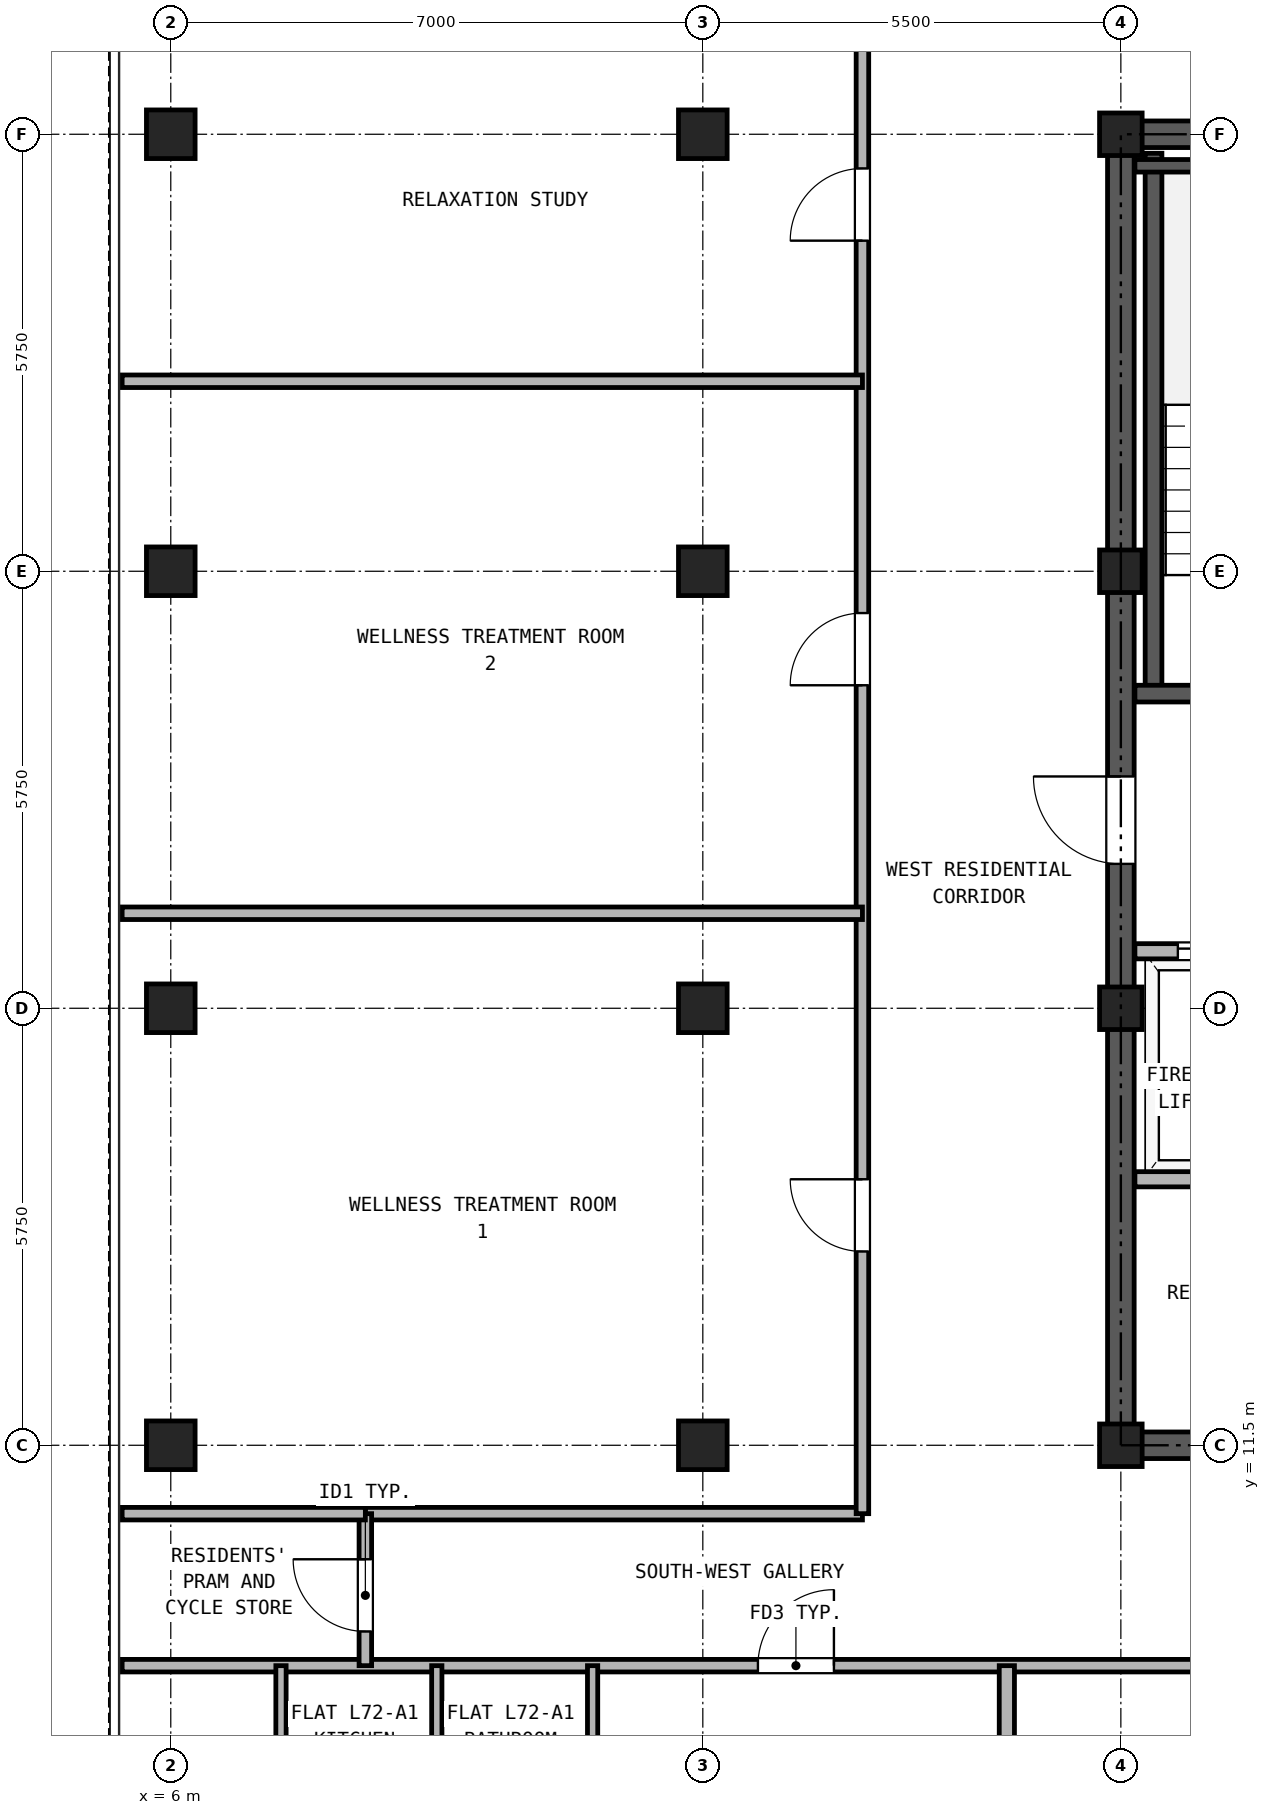
"""IFC4 building model, lengths in metres.
Left out: names, types, materials, properties, quantities, classifications, styles, units other than length and angle.
Written with IfcOpenShell. Run it as: python <this file> out.ifc"""

import sys

from ifc_helpers import new_model, si_unit, direction, frame, frame_2d, origin, origin_2d, place, context, subcontext, project, spatial, rectangle, hollow_rectangle, extrude, source, transform, mapped, element, fill, save


model = new_model("IFC4")
c1 = context("Model", 3, precision=1e-05, world=origin(), true_north=direction((0.0, 1.0)))
c2 = subcontext(c1, "Body", "Model", "MODEL_VIEW")
j1 = project(units=[si_unit("LENGTHUNIT", "METRE"), si_unit("PLANEANGLEUNIT", "RADIAN")], contexts=[c1])
p1 = place(None, origin())
s1 = spatial("IfcSite", under=j1, at=p1, CompositionType="ELEMENT")
p2 = place(p1, origin())
s2 = spatial("IfcBuilding", under=s1, at=p2, CompositionType="ELEMENT")
p3 = place(p2, frame((0.0, 0.0, 252.1)))
s3 = spatial("IfcBuildingStorey", under=s2, at=p3, CompositionType="ELEMENT", Elevation=252.1)
m1 = source(origin(), c2, "Body", "SweptSolid", [
    extrude(hollow_rectangle(XDim=0.64, YDim=0.64, WallThickness=0.035, at=origin_2d()), origin(), (0.0, 0.0, 1.0), 2.98),
])
for number, where, z_axis, x_axis in (
    (1, (6.0, 11.5, 0.0), (0.0, 0.0, 1.0), (1.0, 0.0, 0.0)),
    (2, (6.0, 17.25, 0.0), (0.0, 0.0, 1.0), (1.0, 0.0, 0.0)),
    (3, (6.0, 23.0, 0.0), (0.0, 0.0, 1.0), (1.0, 0.0, 0.0)),
    (4, (6.0, 28.75, 0.0), (0.0, 0.0, 1.0), (1.0, 0.0, 0.0)),
    (5, (13.0, 11.5, 0.0), (0.0, 0.0, 1.0), (1.0, 0.0, 0.0)),
    (6, (13.0, 17.25, 0.0), (0.0, 0.0, 1.0), (1.0, 0.0, 0.0)),
    (7, (13.0, 23.0, 0.0), (0.0, 0.0, 1.0), (1.0, 0.0, 0.0)),
    (8, (13.0, 28.75, 0.0), (0.0, 0.0, 1.0), (1.0, 0.0, 0.0)),
):
    element("IfcColumn", number, at=place(p3, frame(where, z_axis=z_axis, x_axis=x_axis)), inside=s3, PredefinedType="COLUMN", context=c2, shape_type="MappedRepresentation", body=[
        mapped(m1, transform((0.0, 0.0, 0.0), x_axis=(1.0, 0.0, 0.0), y_axis=(0.0, 1.0, 0.0), z_axis=(0.0, 0.0, 1.0), scale=1.0)),
    ])
m2 = source(origin(), c2, "Body", "SweptSolid", [
    extrude(hollow_rectangle(XDim=0.56, YDim=0.56, WallThickness=0.03, at=origin_2d()), origin(), (0.0, 0.0, 1.0), 2.98),
])
for number, where, z_axis, x_axis in (
    (9, (18.5, 11.5, 0.0), (0.0, 0.0, 1.0), (1.0, 0.0, 0.0)),
    (10, (18.5, 17.25, 0.0), (0.0, 0.0, 1.0), (1.0, 0.0, 0.0)),
    (11, (18.5, 23.0, 0.0), (0.0, 0.0, 1.0), (1.0, 0.0, 0.0)),
    (12, (18.5, 28.75, 0.0), (0.0, 0.0, 1.0), (1.0, 0.0, 0.0)),
):
    element("IfcColumn", number, at=place(p3, frame(where, z_axis=z_axis, x_axis=x_axis)), inside=s3, PredefinedType="COLUMN", context=c2, shape_type="MappedRepresentation", body=[
        mapped(m2, transform((0.0, 0.0, 0.0), x_axis=(1.0, 0.0, 0.0), y_axis=(0.0, 1.0, 0.0), z_axis=(0.0, 0.0, 1.0), scale=1.0)),
    ])
p4 = place(p3, frame((18.325, 11.5, 0.0), z_axis=(0.0, 0.0, 1.0), x_axis=(1.0, 0.0, 0.0)))
e13 = element("IfcWall", 13, at=p4, inside=s3, PredefinedType="SHEAR", context=c2, shape_type="SweptSolid", body=[
    extrude(rectangle(XDim=10.35, YDim=0.35, at=frame_2d((5.175, 0.0))), origin(), (0.0, 0.0, 1.0), 2.98),
])
p5 = place(p4, frame((1.775, 0.0, 0.0)))
e14 = element("IfcOpeningElement", 14, at=p5, cuts=e13, PredefinedType="OPENING", context=c2, shape_type="SweptSolid", body=[
    extrude(rectangle(XDim=0.95, YDim=2.15, at=frame_2d((0.475, 1.075))), frame((0.0, 0.185, 0.0), z_axis=(0.0, -1.0, 0.0), x_axis=(1.0, 0.0, 0.0)), (0.0, 0.0, 1.0), 0.37),
])
p6 = place(p4, frame((5.275, 0.0, 0.0)))
e15 = element("IfcOpeningElement", 15, at=p6, cuts=e13, PredefinedType="OPENING", context=c2, shape_type="SweptSolid", body=[
    extrude(rectangle(XDim=0.95, YDim=2.15, at=frame_2d((0.475, 1.075))), frame((0.0, 0.185, 0.0), z_axis=(0.0, -1.0, 0.0), x_axis=(1.0, 0.0, 0.0)), (0.0, 0.0, 1.0), 0.37),
])
p7 = place(p4, frame((8.175, 0.0, 0.0)))
e16 = element("IfcOpeningElement", 16, at=p7, cuts=e13, PredefinedType="OPENING", context=c2, shape_type="SweptSolid", body=[
    extrude(rectangle(XDim=1.1, YDim=2.25, at=frame_2d((0.55, 1.125))), frame((0.0, 0.185, 0.0), z_axis=(0.0, -1.0, 0.0), x_axis=(1.0, 0.0, 0.0)), (0.0, 0.0, 1.0), 0.37),
])
p8 = place(p3, frame((18.325, 28.75, 0.0), z_axis=(0.0, 0.0, 1.0), x_axis=(1.0, 0.0, 0.0)))
e17 = element("IfcWall", 17, at=p8, inside=s3, PredefinedType="SHEAR", context=c2, shape_type="SweptSolid", body=[
    extrude(rectangle(XDim=10.35, YDim=0.35, at=frame_2d((5.175, 0.0))), origin(), (0.0, 0.0, 1.0), 2.98),
])
p9 = place(p8, frame((4.055, 0.0, 0.0)))
e18 = element("IfcOpeningElement", 18, at=p9, cuts=e17, PredefinedType="OPENING", context=c2, shape_type="SweptSolid", body=[
    extrude(rectangle(XDim=0.9, YDim=2.05, at=frame_2d((0.45, 1.025))), frame((0.0, 0.185, 0.0), z_axis=(0.0, -1.0, 0.0), x_axis=(1.0, 0.0, 0.0)), (0.0, 0.0, 1.0), 0.37),
])
p10 = place(p8, frame((5.595, 0.0, 0.0)))
e19 = element("IfcOpeningElement", 19, at=p10, cuts=e17, PredefinedType="OPENING", context=c2, shape_type="SweptSolid", body=[
    extrude(rectangle(XDim=0.9, YDim=2.05, at=frame_2d((0.45, 1.025))), frame((0.0, 0.185, 0.0), z_axis=(0.0, -1.0, 0.0), x_axis=(1.0, 0.0, 0.0)), (0.0, 0.0, 1.0), 0.37),
])
p11 = place(p3, frame((18.5, 11.675, 0.0), z_axis=(0.0, 0.0, 1.0), x_axis=(0.0, 1.0, 0.0)))
e20 = element("IfcWall", 20, at=p11, inside=s3, PredefinedType="SHEAR", context=c2, shape_type="SweptSolid", body=[
    extrude(rectangle(XDim=16.9, YDim=0.35, at=frame_2d((8.45, 0.0))), origin(), (0.0, 0.0, 1.0), 2.98),
])
p12 = place(p11, frame((7.475, 0.0, 0.0)))
e21 = element("IfcOpeningElement", 21, at=p12, cuts=e20, PredefinedType="OPENING", context=c2, shape_type="SweptSolid", body=[
    extrude(rectangle(XDim=1.15, YDim=2.2, at=frame_2d((0.575, 1.1))), frame((0.0, 0.185, 0.0), z_axis=(0.0, -1.0, 0.0), x_axis=(1.0, 0.0, 0.0)), (0.0, 0.0, 1.0), 0.37),
])
p13 = place(p3, frame((18.93, 21.39, 0.0), z_axis=(0.0, 0.0, 1.0), x_axis=(0.0, 1.0, 0.0)))
e22 = element("IfcWall", 22, at=p13, inside=s3, PredefinedType="SOLIDWALL", context=c2, shape_type="SweptSolid", body=[
    extrude(rectangle(XDim=7.11, YDim=0.22, at=frame_2d((3.555, 0.0))), origin(), (0.0, 0.0, 1.0), 2.98),
])
p14 = place(p3, frame((18.685, 28.335, 0.0), z_axis=(0.0, 0.0, 1.0), x_axis=(1.0, 0.0, 0.0)))
e23 = element("IfcWall", 23, at=p14, inside=s3, PredefinedType="PARTITIONING", context=c2, shape_type="SweptSolid", body=[
    extrude(rectangle(XDim=3.425, YDim=0.165, at=frame_2d((1.712, 0.0))), origin(), (0.0, 0.0, 1.0), 2.98),
])
p15 = place(p3, frame((18.685, 21.39, 0.0), z_axis=(0.0, 0.0, 1.0), x_axis=(1.0, 0.0, 0.0)))
e24 = element("IfcWall", 24, at=p15, inside=s3, PredefinedType="SOLIDWALL", context=c2, shape_type="SweptSolid", body=[
    extrude(rectangle(XDim=6.445, YDim=0.22, at=frame_2d((3.222, 0.0))), origin(), (0.0, 0.0, 1.0), 2.98),
])
p16 = place(p15, frame((1.165, 0.0, 0.0)))
e25 = element("IfcOpeningElement", 25, at=p16, cuts=e24, PredefinedType="OPENING", context=c2, shape_type="SweptSolid", body=[
    extrude(rectangle(XDim=1.15, YDim=2.2, at=frame_2d((0.575, 1.1))), frame((0.0, 0.12, 0.0), z_axis=(0.0, -1.0, 0.0), x_axis=(1.0, 0.0, 0.0)), (0.0, 0.0, 1.0), 0.24),
])
p17 = place(p15, frame((4.895, 0.0, 0.0)))
e26 = element("IfcOpeningElement", 26, at=p17, cuts=e24, PredefinedType="OPENING", context=c2, shape_type="SweptSolid", body=[
    extrude(rectangle(XDim=1.1, YDim=2.25, at=frame_2d((0.55, 1.125))), frame((0.0, 0.12, 0.0), z_axis=(0.0, -1.0, 0.0), x_axis=(1.0, 0.0, 0.0)), (0.0, 0.0, 1.0), 0.24),
])
p18 = place(p3, frame((18.685, 18.0, 0.0), z_axis=(0.0, 0.0, 1.0), x_axis=(1.0, 0.0, 0.0)))
e27 = element("IfcWall", 27, at=p18, inside=s3, PredefinedType="PARTITIONING", context=c2, shape_type="SweptSolid", body=[
    extrude(rectangle(XDim=9.63, YDim=0.2, at=frame_2d((4.815, 0.0))), origin(), (0.0, 0.0, 1.0), 2.98),
])
p19 = place(p18, frame((0.565, 0.0, 0.0)))
e28 = element("IfcOpeningElement", 28, at=p19, cuts=e27, PredefinedType="OPENING", context=c2, shape_type="SweptSolid", body=[
    extrude(rectangle(XDim=1.3, YDim=2.3, at=frame_2d((0.65, 1.15))), frame((0.0, 0.11, 0.0), z_axis=(0.0, -1.0, 0.0), x_axis=(1.0, 0.0, 0.0)), (0.0, 0.0, 1.0), 0.22),
])
p20 = place(p18, frame((2.665, 0.0, 0.0)))
e29 = element("IfcOpeningElement", 29, at=p20, cuts=e27, PredefinedType="OPENING", context=c2, shape_type="SweptSolid", body=[
    extrude(rectangle(XDim=1.3, YDim=2.3, at=frame_2d((0.65, 1.15))), frame((0.0, 0.11, 0.0), z_axis=(0.0, -1.0, 0.0), x_axis=(1.0, 0.0, 0.0)), (0.0, 0.0, 1.0), 0.22),
])
p21 = place(p18, frame((5.085, 0.0, 0.0)))
e30 = element("IfcOpeningElement", 30, at=p21, cuts=e27, PredefinedType="OPENING", context=c2, shape_type="SweptSolid", body=[
    extrude(rectangle(XDim=0.9, YDim=2.05, at=frame_2d((0.45, 1.025))), frame((0.0, 0.11, 0.0), z_axis=(0.0, -1.0, 0.0), x_axis=(1.0, 0.0, 0.0)), (0.0, 0.0, 1.0), 0.22),
])
p22 = place(p18, frame((8.215, 0.0, 0.0)))
e31 = element("IfcOpeningElement", 31, at=p22, cuts=e27, PredefinedType="OPENING", context=c2, shape_type="SweptSolid", body=[
    extrude(rectangle(XDim=0.9, YDim=2.05, at=frame_2d((0.45, 1.025))), frame((0.0, 0.11, 0.0), z_axis=(0.0, -1.0, 0.0), x_axis=(1.0, 0.0, 0.0)), (0.0, 0.0, 1.0), 0.22),
])
p23 = place(p3, frame((18.685, 15.0, 0.0), z_axis=(0.0, 0.0, 1.0), x_axis=(1.0, 0.0, 0.0)))
e32 = element("IfcWall", 32, at=p23, inside=s3, PredefinedType="PARTITIONING", context=c2, shape_type="SweptSolid", body=[
    extrude(rectangle(XDim=9.63, YDim=0.2, at=frame_2d((4.815, 0.0))), origin(), (0.0, 0.0, 1.0), 2.98),
])
p24 = place(p3, frame((5.36, 8.6, 0.0), z_axis=(0.0, 0.0, 1.0), x_axis=(1.0, 0.0, 0.0)))
e33 = element("IfcWall", 33, at=p24, inside=s3, PredefinedType="PARTITIONING", context=c2, shape_type="SweptSolid", body=[
    extrude(rectangle(XDim=36.28, YDim=0.165, at=frame_2d((18.14, 0.0))), origin(), (0.0, 0.0, 1.0), 2.655),
])
p25 = place(p24, frame((8.365, 0.0, 0.0)))
e34 = element("IfcOpeningElement", 34, at=p25, cuts=e33, PredefinedType="OPENING", context=c2, shape_type="SweptSolid", body=[
    extrude(rectangle(XDim=1.0, YDim=2.15, at=frame_2d((0.5, 1.075))), frame((0.0, 0.093, 0.0), z_axis=(0.0, -1.0, 0.0), x_axis=(1.0, 0.0, 0.0)), (0.0, 0.0, 1.0), 0.185),
])
p26 = place(p24, frame((14.165, 0.0, 0.0)))
e35 = element("IfcOpeningElement", 35, at=p26, cuts=e33, PredefinedType="OPENING", context=c2, shape_type="SweptSolid", body=[
    extrude(rectangle(XDim=1.0, YDim=2.15, at=frame_2d((0.5, 1.075))), frame((0.0, 0.093, 0.0), z_axis=(0.0, -1.0, 0.0), x_axis=(1.0, 0.0, 0.0)), (0.0, 0.0, 1.0), 0.185),
])
p27 = place(p24, frame((26.415, 0.0, 0.0)))
e36 = element("IfcOpeningElement", 36, at=p27, cuts=e33, PredefinedType="OPENING", context=c2, shape_type="SweptSolid", body=[
    extrude(rectangle(XDim=1.0, YDim=2.15, at=frame_2d((0.5, 1.075))), frame((0.0, 0.093, 0.0), z_axis=(0.0, -1.0, 0.0), x_axis=(1.0, 0.0, 0.0)), (0.0, 0.0, 1.0), 0.185),
])
p28 = place(p3, frame((8.56, 10.6, 0.0), z_axis=(0.0, 0.0, 1.0), x_axis=(1.0, 0.0, 0.0)))
e37 = element("IfcWall", 37, at=p28, inside=s3, PredefinedType="PARTITIONING", context=c2, shape_type="SweptSolid", body=[
    extrude(rectangle(XDim=6.54, YDim=0.165, at=frame_2d((3.27, 0.0))), origin(), (0.0, 0.0, 1.0), 2.98),
])
p29 = place(p3, frame((8.56, 8.6, 0.0), z_axis=(0.0, 0.0, 1.0), x_axis=(0.0, 1.0, 0.0)))
e38 = element("IfcWall", 38, at=p29, inside=s3, PredefinedType="PARTITIONING", context=c2, shape_type="SweptSolid", body=[
    extrude(rectangle(XDim=2.0, YDim=0.165, at=frame_2d((1.0, 0.0))), origin(), (0.0, 0.0, 1.0), 2.98),
])
p30 = place(p29, frame((0.45, 0.0, 0.0)))
e39 = element("IfcOpeningElement", 39, at=p30, cuts=e38, PredefinedType="OPENING", context=c2, shape_type="SweptSolid", body=[
    extrude(rectangle(XDim=0.95, YDim=2.15, at=frame_2d((0.475, 1.075))), frame((0.0, 0.093, 0.0), z_axis=(0.0, -1.0, 0.0), x_axis=(1.0, 0.0, 0.0)), (0.0, 0.0, 1.0), 0.185),
])
p31 = place(p3, frame((15.1, 10.6, 0.0), z_axis=(0.0, 0.0, 1.0), x_axis=(0.0, 1.0, 0.0)))
e40 = element("IfcWall", 40, at=p31, inside=s3, PredefinedType="PARTITIONING", context=c2, shape_type="SweptSolid", body=[
    extrude(rectangle(XDim=24.54, YDim=0.165, at=frame_2d((12.27, 0.0))), origin(), (0.0, 0.0, 1.0), 2.98),
])
p32 = place(p31, frame((3.45, 0.0, 0.0)))
e41 = element("IfcOpeningElement", 41, at=p32, cuts=e40, PredefinedType="OPENING", context=c2, shape_type="SweptSolid", body=[
    extrude(rectangle(XDim=0.95, YDim=2.15, at=frame_2d((0.475, 1.075))), frame((0.0, 0.093, 0.0), z_axis=(0.0, -1.0, 0.0), x_axis=(1.0, 0.0, 0.0)), (0.0, 0.0, 1.0), 0.185),
])
p33 = place(p31, frame((10.9, 0.0, 0.0)))
e42 = element("IfcOpeningElement", 42, at=p33, cuts=e40, PredefinedType="OPENING", context=c2, shape_type="SweptSolid", body=[
    extrude(rectangle(XDim=0.95, YDim=2.15, at=frame_2d((0.475, 1.075))), frame((0.0, 0.093, 0.0), z_axis=(0.0, -1.0, 0.0), x_axis=(1.0, 0.0, 0.0)), (0.0, 0.0, 1.0), 0.185),
])
p34 = place(p31, frame((16.75, 0.0, 0.0)))
e43 = element("IfcOpeningElement", 43, at=p34, cuts=e40, PredefinedType="OPENING", context=c2, shape_type="SweptSolid", body=[
    extrude(rectangle(XDim=0.95, YDim=2.15, at=frame_2d((0.475, 1.075))), frame((0.0, 0.093, 0.0), z_axis=(0.0, -1.0, 0.0), x_axis=(1.0, 0.0, 0.0)), (0.0, 0.0, 1.0), 0.185),
])
p35 = place(p31, frame((20.0, 0.0, 0.0)))
e44 = element("IfcOpeningElement", 44, at=p35, cuts=e40, PredefinedType="OPENING", context=c2, shape_type="SweptSolid", body=[
    extrude(rectangle(XDim=0.92, YDim=2.1, at=frame_2d((0.46, 1.05))), frame((0.0, 0.093, 0.0), z_axis=(0.0, -1.0, 0.0), x_axis=(1.0, 0.0, 0.0)), (0.0, 0.0, 1.0), 0.185),
])
for number, where, z_axis, x_axis in (
    (45, (7.45, 6.45, 0.0), (0.0, 0.0, 1.0), (0.0, 1.0, 0.0)),
    (46, (9.5, 6.45, 0.0), (0.0, 0.0, 1.0), (0.0, 1.0, 0.0)),
    (47, (11.55, 6.45, 0.0), (0.0, 0.0, 1.0), (0.0, 1.0, 0.0)),
):
    element("IfcWall", number, at=place(p3, frame(where, z_axis=z_axis, x_axis=x_axis)), inside=s3, PredefinedType="PARTITIONING", context=c2, shape_type="SweptSolid", body=[
        extrude(rectangle(XDim=2.15, YDim=0.135, at=frame_2d((1.075, 0.0))), origin(), (0.0, 0.0, 1.0), 2.98),
    ])
p36 = place(p3, frame((17.0, 0.16, 0.0), z_axis=(0.0, 0.0, 1.0), x_axis=(0.0, 1.0, 0.0)))
e48 = element("IfcWall", 48, at=p36, inside=s3, PredefinedType="PARTITIONING", context=c2, shape_type="SweptSolid", body=[
    extrude(rectangle(XDim=8.44, YDim=0.2, at=frame_2d((4.22, 0.0))), origin(), (0.0, 0.0, 1.0), 2.98),
])
p37 = place(p3, frame((5.36, 10.6, 0.0), z_axis=(0.0, 0.0, 1.0), x_axis=(1.0, 0.0, 0.0)))
e49 = element("IfcWall", 49, at=p37, inside=s3, PredefinedType="PARTITIONING", context=c2, shape_type="SweptSolid", body=[
    extrude(rectangle(XDim=3.2, YDim=0.165, at=frame_2d((1.6, 0.0))), origin(), (0.0, 0.0, 1.0), 2.98),
])
for number, where, z_axis, x_axis in (
    (50, (5.36, 18.5, 0.0), (0.0, 0.0, 1.0), (1.0, 0.0, 0.0)),
    (51, (5.36, 25.5, 0.0), (0.0, 0.0, 1.0), (1.0, 0.0, 0.0)),
):
    element("IfcWall", number, at=place(p3, frame(where, z_axis=z_axis, x_axis=x_axis)), inside=s3, PredefinedType="PARTITIONING", context=c2, shape_type="SweptSolid", body=[
        extrude(rectangle(XDim=9.74, YDim=0.165, at=frame_2d((4.87, 0.0))), origin(), (0.0, 0.0, 1.0), 2.98),
    ])
p38 = place(p19, origin())
e52 = element("IfcDoor", 52, at=p38, inside=s3, OperationType="DOUBLE_DOOR_SLIDING", PredefinedType="DOOR", context=c2, shape_type="SweptSolid", body=[
    extrude(rectangle(XDim=1.3, YDim=2.3, at=frame_2d((0.65, 1.15))), frame((0.0, 0.025, 0.0), z_axis=(0.0, -1.0, 0.0), x_axis=(1.0, 0.0, 0.0)), (0.0, 0.0, 1.0), 0.05),
])
fill(e28, e52)
p39 = place(p12, frame((1.15, 0.0, 0.0), z_axis=(0.0, 0.0, 1.0), x_axis=(-1.0, 0.0, 0.0)))
e53 = element("IfcDoor", 53, at=p39, inside=s3, OperationType="SINGLE_SWING_RIGHT", PredefinedType="DOOR", context=c2, shape_type="SweptSolid", body=[
    extrude(rectangle(XDim=1.15, YDim=2.2, at=frame_2d((0.575, 1.1))), frame((0.0, 0.025, 0.0), z_axis=(0.0, -1.0, 0.0), x_axis=(1.0, 0.0, 0.0)), (0.0, 0.0, 1.0), 0.05),
])
fill(e21, e53)
p40 = place(p25, frame((1.0, 0.0, 0.0), z_axis=(0.0, 0.0, 1.0), x_axis=(-1.0, 0.0, 0.0)))
e54 = element("IfcDoor", 54, at=p40, inside=s3, OperationType="SINGLE_SWING_RIGHT", PredefinedType="DOOR", context=c2, shape_type="SweptSolid", body=[
    extrude(rectangle(XDim=1.0, YDim=2.15, at=frame_2d((0.5, 1.075))), frame((0.0, 0.025, 0.0), z_axis=(0.0, -1.0, 0.0), x_axis=(1.0, 0.0, 0.0)), (0.0, 0.0, 1.0), 0.05),
])
fill(e34, e54)
p41 = place(p30, frame((0.95, 0.0, 0.0), z_axis=(0.0, 0.0, 1.0), x_axis=(-1.0, 0.0, 0.0)))
e55 = element("IfcDoor", 55, at=p41, inside=s3, OperationType="SINGLE_SWING_RIGHT", PredefinedType="DOOR", context=c2, shape_type="SweptSolid", body=[
    extrude(rectangle(XDim=0.95, YDim=2.15, at=frame_2d((0.475, 1.075))), frame((0.0, 0.025, 0.0), z_axis=(0.0, -1.0, 0.0), x_axis=(1.0, 0.0, 0.0)), (0.0, 0.0, 1.0), 0.05),
])
fill(e39, e55)
p42 = place(p32, frame((0.95, 0.0, 0.0), z_axis=(0.0, 0.0, 1.0), x_axis=(-1.0, 0.0, 0.0)))
e56 = element("IfcDoor", 56, at=p42, inside=s3, OperationType="SINGLE_SWING_RIGHT", PredefinedType="DOOR", context=c2, shape_type="SweptSolid", body=[
    extrude(rectangle(XDim=0.95, YDim=2.15, at=frame_2d((0.475, 1.075))), frame((0.0, 0.025, 0.0), z_axis=(0.0, -1.0, 0.0), x_axis=(1.0, 0.0, 0.0)), (0.0, 0.0, 1.0), 0.05),
])
fill(e41, e56)
p43 = place(p33, frame((0.95, 0.0, 0.0), z_axis=(0.0, 0.0, 1.0), x_axis=(-1.0, 0.0, 0.0)))
e57 = element("IfcDoor", 57, at=p43, inside=s3, OperationType="SINGLE_SWING_LEFT", PredefinedType="DOOR", context=c2, shape_type="SweptSolid", body=[
    extrude(rectangle(XDim=0.95, YDim=2.15, at=frame_2d((0.475, 1.075))), frame((0.0, 0.025, 0.0), z_axis=(0.0, -1.0, 0.0), x_axis=(1.0, 0.0, 0.0)), (0.0, 0.0, 1.0), 0.05),
])
fill(e42, e57)
p44 = place(p34, frame((0.95, 0.0, 0.0), z_axis=(0.0, 0.0, 1.0), x_axis=(-1.0, 0.0, 0.0)))
e58 = element("IfcDoor", 58, at=p44, inside=s3, OperationType="SINGLE_SWING_LEFT", PredefinedType="DOOR", context=c2, shape_type="SweptSolid", body=[
    extrude(rectangle(XDim=0.95, YDim=2.15, at=frame_2d((0.475, 1.075))), frame((0.0, 0.025, 0.0), z_axis=(0.0, -1.0, 0.0), x_axis=(1.0, 0.0, 0.0)), (0.0, 0.0, 1.0), 0.05),
])
fill(e43, e58)
save(model, sys.argv[1])
